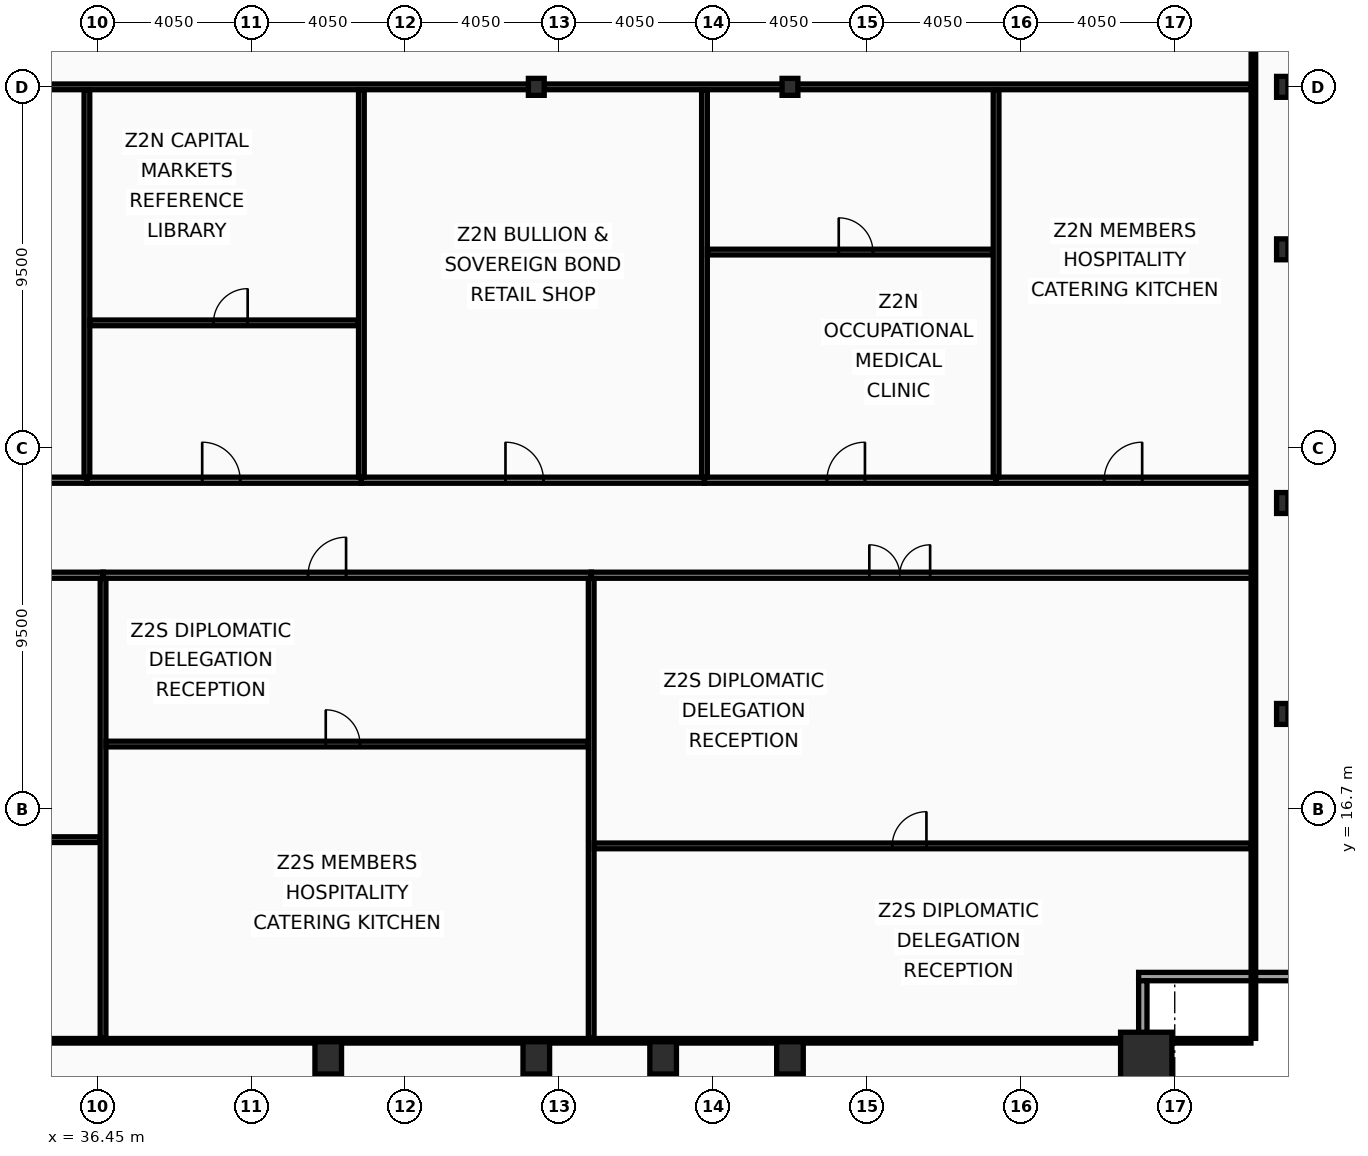
"""IFC4 building model, lengths in metres.
Left out: names, types, materials, properties, quantities, classifications, styles, units other than length and angle.
Written with IfcOpenShell. Run it as: python <this file> out.ifc"""

import sys

from ifc_helpers import new_model, si_unit, direction, frame, frame_2d, origin, origin_2d, place, context, subcontext, project, spatial, rectangle, hollow_rectangle, i_section, extrude, element, fill, save


model = new_model("IFC4")
c1 = context("Model", 3, precision=1e-05, world=origin(), true_north=direction((0.0, 1.0)))
c2 = subcontext(c1, "Body", "Model", "MODEL_VIEW")
j1 = project(units=[si_unit("LENGTHUNIT", "METRE"), si_unit("PLANEANGLEUNIT", "RADIAN")], contexts=[c1])
p1 = place(None, origin())
s1 = spatial("IfcSite", under=j1, at=p1, CompositionType="ELEMENT")
p2 = place(p1, origin())
s2 = spatial("IfcBuilding", under=s1, at=p2, CompositionType="ELEMENT")
p3 = place(p2, frame((0.0, 0.0, 168.6)))
s3 = spatial("IfcBuildingStorey", under=s2, at=p3, CompositionType="ELEMENT", Elevation=168.6)
p4 = place(p3, frame((64.05, 10.15, 0.0), z_axis=(0.0, 0.0, 1.0), x_axis=(1.0, 0.0, 0.0)))
e1 = element("IfcColumn", 1, at=p4, inside=s3, PredefinedType="COLUMN", context=c2, shape_type="SweptSolid", body=[
    extrude(hollow_rectangle(XDim=1.35, YDim=1.35, WallThickness=0.065, at=origin_2d()), origin(), (0.0, 0.0, 1.0), 3.6),
])
for number, where, z_axis, x_axis in (
    (2, (42.525, 10.15, 0.0), (0.0, 0.0, 1.0), (1.0, 0.0, 0.0)),
    (3, (48.0, 10.15, 0.0), (0.0, 0.0, 1.0), (1.0, 0.0, 0.0)),
    (4, (51.337, 10.15, 0.0), (0.0, 0.0, 1.0), (1.0, 0.0, 0.0)),
    (5, (54.675, 10.15, 0.0), (0.0, 0.0, 1.0), (1.0, 0.0, 0.0)),
):
    element("IfcColumn", number, at=place(p3, frame(where, z_axis=z_axis, x_axis=x_axis)), inside=s3, PredefinedType="COLUMN", context=c2, shape_type="SweptSolid", body=[
        extrude(hollow_rectangle(XDim=0.7, YDim=0.85, WallThickness=0.05, at=origin_2d()), origin(), (0.0, 0.0, 1.0), 3.6),
    ])
for number, where, z_axis, x_axis in (
    (6, (67.63, 19.2, 0.0), (0.0, 0.0, 1.0), (1.0, 0.0, 0.0)),
    (7, (67.63, 24.75, 0.0), (0.0, 0.0, 1.0), (1.0, 0.0, 0.0)),
    (8, (67.63, 31.425, 0.0), (0.0, 0.0, 1.0), (1.0, 0.0, 0.0)),
    (9, (67.63, 35.7, 0.0), (0.0, 0.0, 1.0), (1.0, 0.0, 0.0)),
):
    element("IfcColumn", number, at=place(p3, frame(where, z_axis=z_axis, x_axis=x_axis)), inside=s3, PredefinedType="COLUMN", context=c2, shape_type="SweptSolid", body=[
        extrude(i_section(OverallWidth=0.3, OverallDepth=0.55, WebThickness=0.015, FlangeThickness=0.029, at=origin_2d()), origin(), (0.0, 0.0, 1.0), 3.6),
    ])
for number, where, z_axis, x_axis in (
    (10, (48.0, 35.7, 0.0), (0.0, 0.0, 1.0), (1.0, 0.0, 0.0)),
    (11, (54.675, 35.7, 0.0), (0.0, 0.0, 1.0), (1.0, 0.0, 0.0)),
):
    element("IfcColumn", number, at=place(p3, frame(where, z_axis=z_axis, x_axis=x_axis)), inside=s3, PredefinedType="COLUMN", context=c2, shape_type="SweptSolid", body=[
        extrude(i_section(OverallWidth=0.416, OverallDepth=0.446, WebThickness=0.039, FlangeThickness=0.063, at=origin_2d()), origin(), (0.0, 0.0, 1.0), 3.6),
    ])
p5 = place(p3, frame((68.07, 12.29, 0.0), z_axis=(0.0, 0.0, 1.0), x_axis=(-1.0, 0.0, 0.0)))
e12 = element("IfcWall", 12, at=p5, inside=s3, PredefinedType="SOLIDWALL", context=c2, shape_type="SweptSolid", body=[
    extrude(rectangle(XDim=4.22, YDim=0.22, at=frame_2d((2.11, 0.0))), origin(), (0.0, 0.0, 1.0), 2.77),
])
p6 = place(p3, frame((63.96, 12.18, 0.0), z_axis=(0.0, 0.0, 1.0), x_axis=(0.0, -1.0, 0.0)))
e13 = element("IfcWall", 13, at=p6, inside=s3, PredefinedType="SOLIDWALL", context=c2, shape_type="SweptSolid", body=[
    extrude(rectangle(XDim=3.91, YDim=0.22, at=frame_2d((1.955, 0.0))), origin(), (0.0, 0.0, 1.0), 2.77),
])
p7 = place(p3, frame((26.741, 22.85, 0.0), z_axis=(0.0, 0.0, 1.0), x_axis=(1.0, 0.0, 0.0)))
e14 = element("IfcWall", 14, at=p7, inside=s3, PredefinedType="PARTITIONING", context=c2, shape_type="SweptSolid", body=[
    extrude(rectangle(XDim=9.858, YDim=0.16, at=frame_2d((4.929, 0.0))), origin(), (0.0, 0.0, 1.0), 2.67),
])
p8 = place(p7, frame((4.14, 0.0, 0.0)))
e15 = element("IfcOpeningElement", 15, at=p8, cuts=e14, PredefinedType="OPENING", context=c2, shape_type="SweptSolid", body=[
    extrude(rectangle(XDim=1.0, YDim=2.05, at=frame_2d((0.5, 1.025))), frame((0.0, 0.09, 0.0), z_axis=(0.0, -1.0, 0.0), x_axis=(1.0, 0.0, 0.0)), (0.0, 0.0, 1.0), 0.18),
])
p9 = place(p3, frame((26.822, 15.892, 0.0), z_axis=(0.0, 0.0, 1.0), x_axis=(1.0, 0.0, 0.0)))
e16 = element("IfcWall", 16, at=p9, inside=s3, PredefinedType="PARTITIONING", context=c2, shape_type="SweptSolid", body=[
    extrude(rectangle(XDim=9.698, YDim=0.15, at=frame_2d((4.849, 0.0))), origin(), (0.0, 0.0, 1.0), 2.67),
])
p10 = place(p9, frame((4.436, 0.0, 0.0)))
e17 = element("IfcOpeningElement", 17, at=p10, cuts=e16, PredefinedType="OPENING", context=c2, shape_type="SweptSolid", body=[
    extrude(rectangle(XDim=0.9, YDim=2.05, at=frame_2d((0.45, 1.025))), frame((0.0, 0.085, 0.0), z_axis=(0.0, -1.0, 0.0), x_axis=(1.0, 0.0, 0.0)), (0.0, 0.0, 1.0), 0.17),
])
p11 = place(p3, frame((36.599, 22.85, 0.0), z_axis=(0.0, 0.0, 1.0), x_axis=(1.0, 0.0, 0.0)))
e18 = element("IfcWall", 18, at=p11, inside=s3, PredefinedType="PARTITIONING", context=c2, shape_type="SweptSolid", body=[
    extrude(rectangle(XDim=12.845, YDim=0.16, at=frame_2d((6.423, 0.0))), origin(), (0.0, 0.0, 1.0), 2.67),
])
p12 = place(p11, frame((5.395, 0.0, 0.0)))
e19 = element("IfcOpeningElement", 19, at=p12, cuts=e18, PredefinedType="OPENING", context=c2, shape_type="SweptSolid", body=[
    extrude(rectangle(XDim=1.0, YDim=2.05, at=frame_2d((0.5, 1.025))), frame((0.0, 0.09, 0.0), z_axis=(0.0, -1.0, 0.0), x_axis=(1.0, 0.0, 0.0)), (0.0, 0.0, 1.0), 0.18),
])
p13 = place(p3, frame((36.599, 10.665, 0.0), z_axis=(0.0, 0.0, 1.0), x_axis=(0.0, 1.0, 0.0)))
e20 = element("IfcWall", 20, at=p13, inside=s3, PredefinedType="PARTITIONING", context=c2, shape_type="SweptSolid", body=[
    extrude(rectangle(XDim=12.1, YDim=0.15, at=frame_2d((6.05, 0.0))), origin(), (0.0, 0.0, 1.0), 2.87),
])
p14 = place(p3, frame((36.679, 18.408, 0.0), z_axis=(0.0, 0.0, 1.0), x_axis=(1.0, 0.0, 0.0)))
e21 = element("IfcWall", 21, at=p14, inside=s3, PredefinedType="PARTITIONING", context=c2, shape_type="SweptSolid", body=[
    extrude(rectangle(XDim=12.685, YDim=0.15, at=frame_2d((6.343, 0.0))), origin(), (0.0, 0.0, 1.0), 2.67),
])
p15 = place(p14, frame((5.78, 0.0, 0.0)))
e22 = element("IfcOpeningElement", 22, at=p15, cuts=e21, PredefinedType="OPENING", context=c2, shape_type="SweptSolid", body=[
    extrude(rectangle(XDim=0.9, YDim=2.05, at=frame_2d((0.45, 1.025))), frame((0.0, 0.085, 0.0), z_axis=(0.0, -1.0, 0.0), x_axis=(1.0, 0.0, 0.0)), (0.0, 0.0, 1.0), 0.17),
])
p16 = place(p3, frame((49.445, 22.85, 0.0), z_axis=(0.0, 0.0, 1.0), x_axis=(1.0, 0.0, 0.0)))
e23 = element("IfcWall", 23, at=p16, inside=s3, PredefinedType="PARTITIONING", context=c2, shape_type="SweptSolid", body=[
    extrude(rectangle(XDim=17.426, YDim=0.16, at=frame_2d((8.713, 0.0))), origin(), (0.0, 0.0, 1.0), 2.67),
])
p17 = place(p16, frame((7.319, 0.0, 0.0)))
e24 = element("IfcOpeningElement", 24, at=p17, cuts=e23, PredefinedType="OPENING", context=c2, shape_type="SweptSolid", body=[
    extrude(rectangle(XDim=1.6, YDim=2.15, at=frame_2d((0.8, 1.075))), frame((0.0, 0.09, 0.0), z_axis=(0.0, -1.0, 0.0), x_axis=(1.0, 0.0, 0.0)), (0.0, 0.0, 1.0), 0.18),
])
p18 = place(p3, frame((49.445, 10.665, 0.0), z_axis=(0.0, 0.0, 1.0), x_axis=(0.0, 1.0, 0.0)))
e25 = element("IfcWall", 25, at=p18, inside=s3, PredefinedType="PARTITIONING", context=c2, shape_type="SweptSolid", body=[
    extrude(rectangle(XDim=12.1, YDim=0.15, at=frame_2d((6.05, 0.0))), origin(), (0.0, 0.0, 1.0), 2.87),
])
p19 = place(p3, frame((49.524, 15.728, 0.0), z_axis=(0.0, 0.0, 1.0), x_axis=(1.0, 0.0, 0.0)))
e26 = element("IfcWall", 26, at=p19, inside=s3, PredefinedType="PARTITIONING", context=c2, shape_type="SweptSolid", body=[
    extrude(rectangle(XDim=17.281, YDim=0.15, at=frame_2d((8.64, 0.0))), origin(), (0.0, 0.0, 1.0), 2.67),
])
p20 = place(p19, frame((7.842, 0.0, 0.0)))
e27 = element("IfcOpeningElement", 27, at=p20, cuts=e26, PredefinedType="OPENING", context=c2, shape_type="SweptSolid", body=[
    extrude(rectangle(XDim=0.9, YDim=2.05, at=frame_2d((0.45, 1.025))), frame((0.0, 0.085, 0.0), z_axis=(0.0, -1.0, 0.0), x_axis=(1.0, 0.0, 0.0)), (0.0, 0.0, 1.0), 0.17),
])
p21 = place(p3, frame((21.81, 35.7, 0.0), z_axis=(0.0, 0.0, 1.0), x_axis=(1.0, 0.0, 0.0)))
e28 = element("IfcWall", 28, at=p21, inside=s3, PredefinedType="PARTITIONING", context=c2, shape_type="SweptSolid", body=[
    extrude(rectangle(XDim=44.995, YDim=0.15, at=frame_2d((22.498, 0.0))), origin(), (0.0, 0.0, 1.0), 2.67),
])
p22 = place(p3, frame((28.05, 25.35, 0.0), z_axis=(0.0, 0.0, 1.0), x_axis=(1.0, 0.0, 0.0)))
e29 = element("IfcWall", 29, at=p22, inside=s3, PredefinedType="PARTITIONING", context=c2, shape_type="SweptSolid", body=[
    extrude(rectangle(XDim=8.125, YDim=0.16, at=frame_2d((4.062, 0.0))), origin(), (0.0, 0.0, 1.0), 2.67),
])
p23 = place(p22, frame((3.413, 0.0, 0.0)))
e30 = element("IfcOpeningElement", 30, at=p23, cuts=e29, PredefinedType="OPENING", context=c2, shape_type="SweptSolid", body=[
    extrude(rectangle(XDim=1.0, YDim=2.05, at=frame_2d((0.5, 1.025))), frame((0.0, 0.09, 0.0), z_axis=(0.0, -1.0, 0.0), x_axis=(1.0, 0.0, 0.0)), (0.0, 0.0, 1.0), 0.18),
])
p24 = place(p3, frame((36.175, 25.35, 0.0), z_axis=(0.0, 0.0, 1.0), x_axis=(1.0, 0.0, 0.0)))
e31 = element("IfcWall", 31, at=p24, inside=s3, PredefinedType="PARTITIONING", context=c2, shape_type="SweptSolid", body=[
    extrude(rectangle(XDim=7.222, YDim=0.16, at=frame_2d((3.611, 0.0))), origin(), (0.0, 0.0, 1.0), 2.67),
])
p25 = place(p24, frame((3.033, 0.0, 0.0)))
e32 = element("IfcOpeningElement", 32, at=p25, cuts=e31, PredefinedType="OPENING", context=c2, shape_type="SweptSolid", body=[
    extrude(rectangle(XDim=1.0, YDim=2.05, at=frame_2d((0.5, 1.025))), frame((0.0, 0.09, 0.0), z_axis=(0.0, -1.0, 0.0), x_axis=(1.0, 0.0, 0.0)), (0.0, 0.0, 1.0), 0.18),
])
p26 = place(p3, frame((36.175, 25.435, 0.0), z_axis=(0.0, 0.0, 1.0), x_axis=(0.0, 1.0, 0.0)))
e33 = element("IfcWall", 33, at=p26, inside=s3, PredefinedType="PARTITIONING", context=c2, shape_type="SweptSolid", body=[
    extrude(rectangle(XDim=10.185, YDim=0.15, at=frame_2d((5.093, 0.0))), origin(), (0.0, 0.0, 1.0), 2.87),
])
p27 = place(p3, frame((36.255, 29.49, 0.0), z_axis=(0.0, 0.0, 1.0), x_axis=(1.0, 0.0, 0.0)))
e34 = element("IfcWall", 34, at=p27, inside=s3, PredefinedType="PARTITIONING", context=c2, shape_type="SweptSolid", body=[
    extrude(rectangle(XDim=7.062, YDim=0.15, at=frame_2d((3.531, 0.0))), origin(), (0.0, 0.0, 1.0), 2.67),
])
p28 = place(p27, frame((3.25, 0.0, 0.0)))
e35 = element("IfcOpeningElement", 35, at=p28, cuts=e34, PredefinedType="OPENING", context=c2, shape_type="SweptSolid", body=[
    extrude(rectangle(XDim=0.9, YDim=2.05, at=frame_2d((0.45, 1.025))), frame((0.0, 0.085, 0.0), z_axis=(0.0, -1.0, 0.0), x_axis=(1.0, 0.0, 0.0)), (0.0, 0.0, 1.0), 0.17),
])
p29 = place(p3, frame((43.397, 25.35, 0.0), z_axis=(0.0, 0.0, 1.0), x_axis=(1.0, 0.0, 0.0)))
e36 = element("IfcWall", 36, at=p29, inside=s3, PredefinedType="PARTITIONING", context=c2, shape_type="SweptSolid", body=[
    extrude(rectangle(XDim=9.028, YDim=0.16, at=frame_2d((4.514, 0.0))), origin(), (0.0, 0.0, 1.0), 2.67),
])
p30 = place(p29, frame((3.792, 0.0, 0.0)))
e37 = element("IfcOpeningElement", 37, at=p30, cuts=e36, PredefinedType="OPENING", context=c2, shape_type="SweptSolid", body=[
    extrude(rectangle(XDim=1.0, YDim=2.05, at=frame_2d((0.5, 1.025))), frame((0.0, 0.09, 0.0), z_axis=(0.0, -1.0, 0.0), x_axis=(1.0, 0.0, 0.0)), (0.0, 0.0, 1.0), 0.18),
])
p31 = place(p3, frame((43.397, 25.435, 0.0), z_axis=(0.0, 0.0, 1.0), x_axis=(0.0, 1.0, 0.0)))
e38 = element("IfcWall", 38, at=p31, inside=s3, PredefinedType="PARTITIONING", context=c2, shape_type="SweptSolid", body=[
    extrude(rectangle(XDim=10.185, YDim=0.15, at=frame_2d((5.093, 0.0))), origin(), (0.0, 0.0, 1.0), 2.87),
])
p32 = place(p3, frame((52.425, 25.35, 0.0), z_axis=(0.0, 0.0, 1.0), x_axis=(1.0, 0.0, 0.0)))
e39 = element("IfcWall", 39, at=p32, inside=s3, PredefinedType="PARTITIONING", context=c2, shape_type="SweptSolid", body=[
    extrude(rectangle(XDim=7.674, YDim=0.16, at=frame_2d((3.837, 0.0))), origin(), (0.0, 0.0, 1.0), 2.67),
])
p33 = place(p32, frame((3.223, 0.0, 0.0)))
e40 = element("IfcOpeningElement", 40, at=p33, cuts=e39, PredefinedType="OPENING", context=c2, shape_type="SweptSolid", body=[
    extrude(rectangle(XDim=1.0, YDim=2.05, at=frame_2d((0.5, 1.025))), frame((0.0, 0.09, 0.0), z_axis=(0.0, -1.0, 0.0), x_axis=(1.0, 0.0, 0.0)), (0.0, 0.0, 1.0), 0.18),
])
p34 = place(p3, frame((52.425, 25.435, 0.0), z_axis=(0.0, 0.0, 1.0), x_axis=(0.0, 1.0, 0.0)))
e41 = element("IfcWall", 41, at=p34, inside=s3, PredefinedType="PARTITIONING", context=c2, shape_type="SweptSolid", body=[
    extrude(rectangle(XDim=10.185, YDim=0.15, at=frame_2d((5.093, 0.0))), origin(), (0.0, 0.0, 1.0), 2.87),
])
p35 = place(p3, frame((52.505, 31.353, 0.0), z_axis=(0.0, 0.0, 1.0), x_axis=(1.0, 0.0, 0.0)))
e42 = element("IfcWall", 42, at=p35, inside=s3, PredefinedType="PARTITIONING", context=c2, shape_type="SweptSolid", body=[
    extrude(rectangle(XDim=7.514, YDim=0.15, at=frame_2d((3.757, 0.0))), origin(), (0.0, 0.0, 1.0), 2.67),
])
p36 = place(p35, frame((3.453, 0.0, 0.0)))
e43 = element("IfcOpeningElement", 43, at=p36, cuts=e42, PredefinedType="OPENING", context=c2, shape_type="SweptSolid", body=[
    extrude(rectangle(XDim=0.9, YDim=2.05, at=frame_2d((0.45, 1.025))), frame((0.0, 0.085, 0.0), z_axis=(0.0, -1.0, 0.0), x_axis=(1.0, 0.0, 0.0)), (0.0, 0.0, 1.0), 0.17),
])
p37 = place(p3, frame((60.099, 25.35, 0.0), z_axis=(0.0, 0.0, 1.0), x_axis=(1.0, 0.0, 0.0)))
e44 = element("IfcWall", 44, at=p37, inside=s3, PredefinedType="PARTITIONING", context=c2, shape_type="SweptSolid", body=[
    extrude(rectangle(XDim=6.771, YDim=0.16, at=frame_2d((3.385, 0.0))), origin(), (0.0, 0.0, 1.0), 3.38),
])
p38 = place(p37, frame((2.844, 0.0, 0.0)))
e45 = element("IfcOpeningElement", 45, at=p38, cuts=e44, PredefinedType="OPENING", context=c2, shape_type="SweptSolid", body=[
    extrude(rectangle(XDim=1.0, YDim=2.05, at=frame_2d((0.5, 1.025))), frame((0.0, 0.09, 0.0), z_axis=(0.0, -1.0, 0.0), x_axis=(1.0, 0.0, 0.0)), (0.0, 0.0, 1.0), 0.18),
])
p39 = place(p3, frame((60.099, 25.435, 0.0), z_axis=(0.0, 0.0, 1.0), x_axis=(0.0, 1.0, 0.0)))
e46 = element("IfcWall", 46, at=p39, inside=s3, PredefinedType="PARTITIONING", context=c2, shape_type="SweptSolid", body=[
    extrude(rectangle(XDim=10.185, YDim=0.15, at=frame_2d((5.093, 0.0))), origin(), (0.0, 0.0, 1.0), 2.67),
])
p40 = place(p3, frame((66.87, 10.665, 0.0), z_axis=(0.0, 0.0, 1.0), x_axis=(0.0, 1.0, 0.0)))
e47 = element("IfcWall", 47, at=p40, inside=s3, PredefinedType="PARTITIONING", context=c2, shape_type="SweptSolid", body=[
    extrude(rectangle(XDim=42.11, YDim=0.12, at=frame_2d((21.055, 0.0))), origin(), (0.0, 0.0, 1.0), 2.67),
])
p41 = place(p3, frame((6.095, 10.6, 0.0), z_axis=(0.0, 0.0, 1.0), x_axis=(1.0, 0.0, 0.0)))
e48 = element("IfcWall", 48, at=p41, inside=s3, PredefinedType="PARTITIONING", context=c2, shape_type="SweptSolid", body=[
    extrude(rectangle(XDim=60.71, YDim=0.12, at=frame_2d((30.355, 0.0))), origin(), (0.0, 0.0, 1.0), 2.67),
])
p42 = place(p12, origin())
e49 = element("IfcDoor", 49, at=p42, inside=s3, OperationType="SINGLE_SWING_RIGHT", PredefinedType="DOOR", context=c2, shape_type="SweptSolid", body=[
    extrude(rectangle(XDim=1.0, YDim=2.05, at=frame_2d((0.5, 1.025))), frame((0.0, 0.025, 0.0), z_axis=(0.0, -1.0, 0.0), x_axis=(1.0, 0.0, 0.0)), (0.0, 0.0, 1.0), 0.05),
])
fill(e19, e49)
p43 = place(p15, origin())
e50 = element("IfcDoor", 50, at=p43, inside=s3, OperationType="SINGLE_SWING_LEFT", PredefinedType="DOOR", context=c2, shape_type="SweptSolid", body=[
    extrude(rectangle(XDim=0.9, YDim=2.05, at=frame_2d((0.45, 1.025))), frame((0.0, 0.025, 0.0), z_axis=(0.0, -1.0, 0.0), x_axis=(1.0, 0.0, 0.0)), (0.0, 0.0, 1.0), 0.05),
])
fill(e22, e50)
p44 = place(p17, origin())
e51 = element("IfcDoor", 51, at=p44, inside=s3, OperationType="DOUBLE_DOOR_SINGLE_SWING", PredefinedType="DOOR", context=c2, shape_type="SweptSolid", body=[
    extrude(rectangle(XDim=1.6, YDim=2.15, at=frame_2d((0.8, 1.075))), frame((0.0, 0.025, 0.0), z_axis=(0.0, -1.0, 0.0), x_axis=(1.0, 0.0, 0.0)), (0.0, 0.0, 1.0), 0.05),
])
fill(e24, e51)
p45 = place(p20, origin())
e52 = element("IfcDoor", 52, at=p45, inside=s3, OperationType="SINGLE_SWING_RIGHT", PredefinedType="DOOR", context=c2, shape_type="SweptSolid", body=[
    extrude(rectangle(XDim=0.9, YDim=2.05, at=frame_2d((0.45, 1.025))), frame((0.0, 0.025, 0.0), z_axis=(0.0, -1.0, 0.0), x_axis=(1.0, 0.0, 0.0)), (0.0, 0.0, 1.0), 0.05),
])
fill(e27, e52)
p46 = place(p25, origin())
e53 = element("IfcDoor", 53, at=p46, inside=s3, OperationType="SINGLE_SWING_LEFT", PredefinedType="DOOR", context=c2, shape_type="SweptSolid", body=[
    extrude(rectangle(XDim=1.0, YDim=2.05, at=frame_2d((0.5, 1.025))), frame((0.0, 0.025, 0.0), z_axis=(0.0, -1.0, 0.0), x_axis=(1.0, 0.0, 0.0)), (0.0, 0.0, 1.0), 0.05),
])
fill(e32, e53)
p47 = place(p28, origin())
e54 = element("IfcDoor", 54, at=p47, inside=s3, OperationType="SINGLE_SWING_RIGHT", PredefinedType="DOOR", context=c2, shape_type="SweptSolid", body=[
    extrude(rectangle(XDim=0.9, YDim=2.05, at=frame_2d((0.45, 1.025))), frame((0.0, 0.025, 0.0), z_axis=(0.0, -1.0, 0.0), x_axis=(1.0, 0.0, 0.0)), (0.0, 0.0, 1.0), 0.05),
])
fill(e35, e54)
p48 = place(p30, origin())
e55 = element("IfcDoor", 55, at=p48, inside=s3, OperationType="SINGLE_SWING_LEFT", PredefinedType="DOOR", context=c2, shape_type="SweptSolid", body=[
    extrude(rectangle(XDim=1.0, YDim=2.05, at=frame_2d((0.5, 1.025))), frame((0.0, 0.025, 0.0), z_axis=(0.0, -1.0, 0.0), x_axis=(1.0, 0.0, 0.0)), (0.0, 0.0, 1.0), 0.05),
])
fill(e37, e55)
p49 = place(p33, origin())
e56 = element("IfcDoor", 56, at=p49, inside=s3, OperationType="SINGLE_SWING_RIGHT", PredefinedType="DOOR", context=c2, shape_type="SweptSolid", body=[
    extrude(rectangle(XDim=1.0, YDim=2.05, at=frame_2d((0.5, 1.025))), frame((0.0, 0.025, 0.0), z_axis=(0.0, -1.0, 0.0), x_axis=(1.0, 0.0, 0.0)), (0.0, 0.0, 1.0), 0.05),
])
fill(e40, e56)
p50 = place(p36, origin())
e57 = element("IfcDoor", 57, at=p50, inside=s3, OperationType="SINGLE_SWING_LEFT", PredefinedType="DOOR", context=c2, shape_type="SweptSolid", body=[
    extrude(rectangle(XDim=0.9, YDim=2.05, at=frame_2d((0.45, 1.025))), frame((0.0, 0.025, 0.0), z_axis=(0.0, -1.0, 0.0), x_axis=(1.0, 0.0, 0.0)), (0.0, 0.0, 1.0), 0.05),
])
fill(e43, e57)
p51 = place(p38, origin())
e58 = element("IfcDoor", 58, at=p51, inside=s3, OperationType="SINGLE_SWING_RIGHT", PredefinedType="DOOR", context=c2, shape_type="SweptSolid", body=[
    extrude(rectangle(XDim=1.0, YDim=2.05, at=frame_2d((0.5, 1.025))), frame((0.0, 0.025, 0.0), z_axis=(0.0, -1.0, 0.0), x_axis=(1.0, 0.0, 0.0)), (0.0, 0.0, 1.0), 0.05),
])
fill(e45, e58)
save(model, sys.argv[1])
